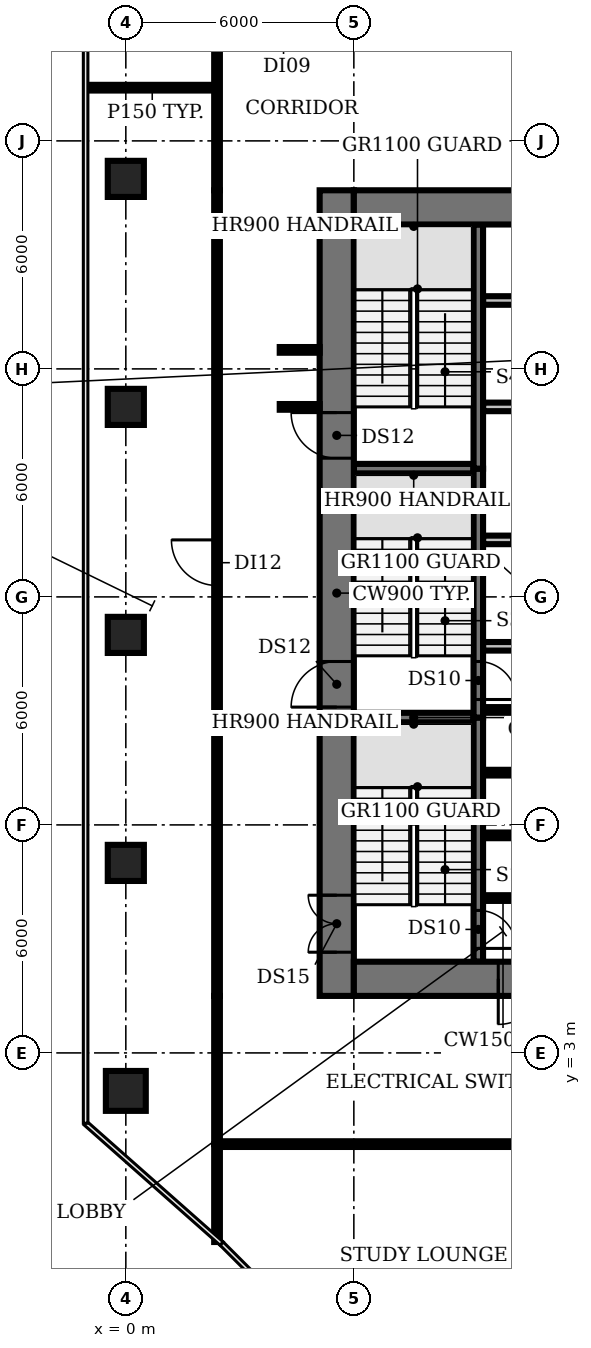
"""IFC4 building model, lengths in metres.
Left out: names, types, materials, properties, quantities, classifications, styles, units other than length and angle.
Written with IfcOpenShell. Run it as: python <this file> out.ifc"""

import sys

from ifc_helpers import new_model, si_unit, direction, frame, frame_2d, origin, origin_2d, place, context, subcontext, project, spatial, rectangle, circle, extrude, element, fill, save


model = new_model("IFC4")
c1 = context("Model", 3, precision=1e-05, world=origin(), true_north=direction((0.0, 1.0)))
c2 = subcontext(c1, "Body", "Model", "MODEL_VIEW")
j1 = project(units=[si_unit("LENGTHUNIT", "METRE"), si_unit("PLANEANGLEUNIT", "RADIAN")], contexts=[c1])
p1 = place(None, origin())
s1 = spatial("IfcSite", under=j1, at=p1, CompositionType="ELEMENT")
p2 = place(p1, origin())
s2 = spatial("IfcBuilding", under=s1, at=p2, CompositionType="ELEMENT")
p3 = place(p2, frame((0.0, 0.0, 66.8)))
s3 = spatial("IfcBuildingStorey", under=s2, at=p3, CompositionType="ELEMENT", Elevation=66.8)
p4 = place(p3, frame((0.0, 2.0, 0.0), z_axis=(0.0, 0.0, 1.0), x_axis=(1.0, 0.0, 0.0)))
e1 = element("IfcColumn", 1, at=p4, inside=s3, PredefinedType="COLUMN", context=c2, shape_type="SweptSolid", body=[
    extrude(circle(Radius=0.525, at=origin_2d()), origin(), (0.0, 0.0, 1.0), 3.85),
])
for number, where, z_axis, x_axis in (
    (2, (0.0, 8.0, 0.0), (0.0, 0.0, 1.0), (1.0, 0.0, 0.0)),
    (3, (0.0, 14.0, 0.0), (0.0, 0.0, 1.0), (1.0, 0.0, 0.0)),
    (4, (0.0, 20.0, 0.0), (0.0, 0.0, 1.0), (1.0, 0.0, 0.0)),
    (5, (0.0, 26.0, 0.0), (0.0, 0.0, 1.0), (1.0, 0.0, 0.0)),
):
    element("IfcColumn", number, at=place(p3, frame(where, z_axis=z_axis, x_axis=x_axis)), inside=s3, PredefinedType="COLUMN", context=c2, shape_type="SweptSolid", body=[
        extrude(rectangle(XDim=0.95, YDim=0.95, at=origin_2d()), origin(), (0.0, 0.0, 1.0), 3.85),
    ])
for number, where, z_axis, x_axis in (
    (6, (9.4, 7.075, 0.0), (0.0, 0.0, 1.0), (1.0, 0.0, 0.0)),
    (7, (9.4, 8.725, 0.0), (0.0, 0.0, 1.0), (1.0, 0.0, 0.0)),
    (8, (9.4, 10.375, 0.0), (0.0, 0.0, 1.0), (1.0, 0.0, 0.0)),
):
    element("IfcWall", number, at=place(p3, frame(where, z_axis=z_axis, x_axis=x_axis)), inside=s3, PredefinedType="SHEAR", context=c2, shape_type="SweptSolid", body=[
        extrude(rectangle(XDim=1.05, YDim=0.15, at=frame_2d((0.525, 0.0))), origin(), (0.0, 0.0, 1.0), 3.85),
    ])
p5 = place(p3, frame((6.0, 11.825, 0.0), z_axis=(0.0, 0.0, 1.0), x_axis=(1.0, 0.0, 0.0)))
e9 = element("IfcWall", 9, at=p5, inside=s3, PredefinedType="SHEAR", context=c2, shape_type="SweptSolid", body=[
    extrude(rectangle(XDim=3.15, YDim=0.25, at=frame_2d((1.575, 0.0))), origin(), (0.0, 0.0, 1.0), 3.85),
])
p6 = place(p3, frame((9.4, 12.025, 0.0), z_axis=(0.0, 0.0, 1.0), x_axis=(1.0, 0.0, 0.0)))
e10 = element("IfcWall", 10, at=p6, inside=s3, PredefinedType="SHEAR", context=c2, shape_type="SweptSolid", body=[
    extrude(rectangle(XDim=1.05, YDim=0.15, at=frame_2d((0.525, 0.0))), origin(), (0.0, 0.0, 1.0), 3.85),
])
p7 = place(p3, frame((9.4, 13.7, 0.0), z_axis=(0.0, 0.0, 1.0), x_axis=(1.0, 0.0, 0.0)))
e11 = element("IfcWall", 11, at=p7, inside=s3, PredefinedType="PARTITIONING", context=c2, shape_type="SweptSolid", body=[
    extrude(rectangle(XDim=4.0, YDim=0.225, at=frame_2d((2.0, 0.0))), origin(), (0.0, 0.0, 1.0), 3.85),
])
p8 = place(p3, frame((9.4, 16.5, 0.0), z_axis=(0.0, 0.0, 1.0), x_axis=(1.0, 0.0, 0.0)))
e12 = element("IfcWall", 12, at=p8, inside=s3, PredefinedType="PARTITIONING", context=c2, shape_type="SweptSolid", body=[
    extrude(rectangle(XDim=14.6, YDim=0.225, at=frame_2d((7.3, 0.0))), origin(), (0.0, 0.0, 1.0), 3.85),
])
p9 = place(p8, frame((0.75, 0.0, 0.0)))
e13 = element("IfcOpeningElement", 13, at=p9, cuts=e12, PredefinedType="OPENING", context=c2, shape_type="SweptSolid", body=[
    extrude(rectangle(XDim=1.1, YDim=2.1, at=frame_2d((0.55, 1.05))), frame((0.0, 0.123, 0.0), z_axis=(0.0, -1.0, 0.0), x_axis=(1.0, 0.0, 0.0)), (0.0, 0.0, 1.0), 0.245),
])
p10 = place(p8, frame((3.55, 0.0, 0.0)))
e14 = element("IfcOpeningElement", 14, at=p10, cuts=e12, PredefinedType="OPENING", context=c2, shape_type="SweptSolid", body=[
    extrude(rectangle(XDim=1.1, YDim=2.1, at=frame_2d((0.55, 1.05))), frame((0.0, 0.123, 0.0), z_axis=(0.0, -1.0, 0.0), x_axis=(1.0, 0.0, 0.0)), (0.0, 0.0, 1.0), 0.245),
])
p11 = place(p8, frame((6.35, 0.0, 0.0)))
e15 = element("IfcOpeningElement", 15, at=p11, cuts=e12, PredefinedType="OPENING", context=c2, shape_type="SweptSolid", body=[
    extrude(rectangle(XDim=1.1, YDim=2.1, at=frame_2d((0.55, 1.05))), frame((0.0, 0.123, 0.0), z_axis=(0.0, -1.0, 0.0), x_axis=(1.0, 0.0, 0.0)), (0.0, 0.0, 1.0), 0.245),
])
p12 = place(p8, frame((9.15, 0.0, 0.0)))
e16 = element("IfcOpeningElement", 16, at=p12, cuts=e12, PredefinedType="OPENING", context=c2, shape_type="SweptSolid", body=[
    extrude(rectangle(XDim=1.1, YDim=2.1, at=frame_2d((0.55, 1.05))), frame((0.0, 0.123, 0.0), z_axis=(0.0, -1.0, 0.0), x_axis=(1.0, 0.0, 0.0)), (0.0, 0.0, 1.0), 0.245),
])
p13 = place(p8, frame((11.308, 0.0, 0.0)))
e17 = element("IfcOpeningElement", 17, at=p13, cuts=e12, PredefinedType="OPENING", context=c2, shape_type="SweptSolid", body=[
    extrude(rectangle(XDim=0.9, YDim=2.1, at=frame_2d((0.45, 1.05))), frame((0.0, 0.123, 0.0), z_axis=(0.0, -1.0, 0.0), x_axis=(1.0, 0.0, 0.0)), (0.0, 0.0, 1.0), 0.245),
])
p14 = place(p8, frame((13.083, 0.0, 0.0)))
e18 = element("IfcOpeningElement", 18, at=p14, cuts=e12, PredefinedType="OPENING", context=c2, shape_type="SweptSolid", body=[
    extrude(rectangle(XDim=0.9, YDim=2.1, at=frame_2d((0.45, 1.05))), frame((0.0, 0.123, 0.0), z_axis=(0.0, -1.0, 0.0), x_axis=(1.0, 0.0, 0.0)), (0.0, 0.0, 1.0), 0.245),
])
p15 = place(p3, frame((6.0, 18.375, 0.0), z_axis=(0.0, 0.0, 1.0), x_axis=(1.0, 0.0, 0.0)))
e19 = element("IfcWall", 19, at=p15, inside=s3, PredefinedType="SHEAR", context=c2, shape_type="SweptSolid", body=[
    extrude(rectangle(XDim=3.15, YDim=0.25, at=frame_2d((1.575, 0.0))), origin(), (0.0, 0.0, 1.0), 3.85),
])
p16 = place(p3, frame((24.0, 20.0, 0.0), z_axis=(0.0, 0.0, 1.0), x_axis=(-1.0, 0.0, 0.0)))
e20 = element("IfcWall", 20, at=p16, inside=s3, PredefinedType="PARTITIONING", context=c2, shape_type="SweptSolid", body=[
    extrude(rectangle(XDim=14.6, YDim=0.225, at=frame_2d((7.3, 0.0))), origin(), (0.0, 0.0, 1.0), 3.85),
])
p17 = place(p16, frame((12.9, 0.0, 0.0)))
e21 = element("IfcOpeningElement", 21, at=p17, cuts=e20, PredefinedType="OPENING", context=c2, shape_type="SweptSolid", body=[
    extrude(rectangle(XDim=0.9, YDim=2.1, at=frame_2d((0.45, 1.05))), frame((0.0, 0.123, 0.0), z_axis=(0.0, -1.0, 0.0), x_axis=(1.0, 0.0, 0.0)), (0.0, 0.0, 1.0), 0.245),
])
p18 = place(p16, frame((9.475, 0.0, 0.0)))
e22 = element("IfcOpeningElement", 22, at=p18, cuts=e20, PredefinedType="OPENING", context=c2, shape_type="SweptSolid", body=[
    extrude(rectangle(XDim=1.0, YDim=2.1, at=frame_2d((0.5, 1.05))), frame((0.0, 0.123, 0.0), z_axis=(0.0, -1.0, 0.0), x_axis=(1.0, 0.0, 0.0)), (0.0, 0.0, 1.0), 0.245),
])
p19 = place(p16, frame((6.375, 0.0, 0.0)))
e23 = element("IfcOpeningElement", 23, at=p19, cuts=e20, PredefinedType="OPENING", context=c2, shape_type="SweptSolid", body=[
    extrude(rectangle(XDim=0.9, YDim=2.1, at=frame_2d((0.45, 1.05))), frame((0.0, 0.123, 0.0), z_axis=(0.0, -1.0, 0.0), x_axis=(1.0, 0.0, 0.0)), (0.0, 0.0, 1.0), 0.245),
])
p20 = place(p16, frame((4.175, 0.0, 0.0)))
e24 = element("IfcOpeningElement", 24, at=p20, cuts=e20, PredefinedType="OPENING", context=c2, shape_type="SweptSolid", body=[
    extrude(rectangle(XDim=0.9, YDim=2.1, at=frame_2d((0.45, 1.05))), frame((0.0, 0.123, 0.0), z_axis=(0.0, -1.0, 0.0), x_axis=(1.0, 0.0, 0.0)), (0.0, 0.0, 1.0), 0.245),
])
p21 = place(p16, frame((2.308, 0.0, 0.0)))
e25 = element("IfcOpeningElement", 25, at=p21, cuts=e20, PredefinedType="OPENING", context=c2, shape_type="SweptSolid", body=[
    extrude(rectangle(XDim=0.9, YDim=2.1, at=frame_2d((0.45, 1.05))), frame((0.0, 0.123, 0.0), z_axis=(0.0, -1.0, 0.0), x_axis=(1.0, 0.0, 0.0)), (0.0, 0.0, 1.0), 0.245),
])
p22 = place(p16, frame((0.532, 0.0, 0.0)))
e26 = element("IfcOpeningElement", 26, at=p22, cuts=e20, PredefinedType="OPENING", context=c2, shape_type="SweptSolid", body=[
    extrude(rectangle(XDim=0.9, YDim=2.1, at=frame_2d((0.45, 1.05))), frame((0.0, 0.123, 0.0), z_axis=(0.0, -1.0, 0.0), x_axis=(1.0, 0.0, 0.0)), (0.0, 0.0, 1.0), 0.245),
])
p23 = place(p3, frame((9.4, 22.8, 0.0), z_axis=(0.0, 0.0, 1.0), x_axis=(1.0, 0.0, 0.0)))
e27 = element("IfcWall", 27, at=p23, inside=s3, PredefinedType="PARTITIONING", context=c2, shape_type="SweptSolid", body=[
    extrude(rectangle(XDim=14.6, YDim=0.225, at=frame_2d((7.3, 0.0))), origin(), (0.0, 0.0, 1.0), 3.85),
])
p24 = place(p3, frame((9.275, 11.825, 0.0), z_axis=(0.0, 0.0, 1.0), x_axis=(0.0, -1.0, 0.0)))
e28 = element("IfcWall", 28, at=p24, inside=s3, PredefinedType="SHEAR", context=c2, shape_type="SweptSolid", body=[
    extrude(rectangle(XDim=6.425, YDim=0.25, at=frame_2d((3.212, 0.0))), origin(), (0.0, 0.0, 1.0), 3.85),
])
p25 = place(p24, frame((5.075, 0.0, 0.0)))
e29 = element("IfcOpeningElement", 29, at=p25, cuts=e28, PredefinedType="OPENING", context=c2, shape_type="SweptSolid", body=[
    extrude(rectangle(XDim=1.0, YDim=2.1, at=frame_2d((0.5, 1.05))), frame((0.0, 0.135, 0.0), z_axis=(0.0, -1.0, 0.0), x_axis=(1.0, 0.0, 0.0)), (0.0, 0.0, 1.0), 0.27),
])
p26 = place(p3, frame((9.275, 18.375, 0.0), z_axis=(0.0, 0.0, 1.0), x_axis=(0.0, -1.0, 0.0)))
e30 = element("IfcWall", 30, at=p26, inside=s3, PredefinedType="SHEAR", context=c2, shape_type="SweptSolid", body=[
    extrude(rectangle(XDim=6.55, YDim=0.25, at=frame_2d((3.275, 0.0))), origin(), (0.0, 0.0, 1.0), 3.85),
])
p27 = place(p26, frame((5.075, 0.0, 0.0)))
e31 = element("IfcOpeningElement", 31, at=p27, cuts=e30, PredefinedType="OPENING", context=c2, shape_type="SweptSolid", body=[
    extrude(rectangle(XDim=1.0, YDim=2.1, at=frame_2d((0.5, 1.05))), frame((0.0, 0.135, 0.0), z_axis=(0.0, -1.0, 0.0), x_axis=(1.0, 0.0, 0.0)), (0.0, 0.0, 1.0), 0.27),
])
p28 = place(p3, frame((9.275, 18.375, 0.0), z_axis=(0.0, 0.0, 1.0), x_axis=(0.0, 1.0, 0.0)))
e32 = element("IfcWall", 32, at=p28, inside=s3, PredefinedType="SHEAR", context=c2, shape_type="SweptSolid", body=[
    extrude(rectangle(XDim=6.425, YDim=0.25, at=frame_2d((3.212, 0.0))), origin(), (0.0, 0.0, 1.0), 3.85),
])
p29 = place(p3, frame((5.55, 4.5, 0.0), z_axis=(0.0, 0.0, 1.0), x_axis=(0.0, 1.0, 0.0)))
e33 = element("IfcWall", 33, at=p29, inside=s3, PredefinedType="SHEAR", context=c2, shape_type="SweptSolid", body=[
    extrude(rectangle(XDim=21.2, YDim=0.9, at=frame_2d((10.6, 0.0))), origin(), (0.0, 0.0, 1.0), 3.85),
])
p30 = place(p29, frame((1.15, 0.0, 0.0)))
e34 = element("IfcOpeningElement", 34, at=p30, cuts=e33, PredefinedType="OPENING", context=c2, shape_type="SweptSolid", body=[
    extrude(rectangle(XDim=1.5, YDim=2.1, at=frame_2d((0.75, 1.05))), frame((0.0, 0.46, 0.0), z_axis=(0.0, -1.0, 0.0), x_axis=(1.0, 0.0, 0.0)), (0.0, 0.0, 1.0), 0.92),
])
p31 = place(p29, frame((7.6, 0.0, 0.0)))
e35 = element("IfcOpeningElement", 35, at=p31, cuts=e33, PredefinedType="OPENING", context=c2, shape_type="SweptSolid", body=[
    extrude(rectangle(XDim=1.2, YDim=2.1, at=frame_2d((0.6, 1.05))), frame((0.0, 0.46, 0.0), z_axis=(0.0, -1.0, 0.0), x_axis=(1.0, 0.0, 0.0)), (0.0, 0.0, 1.0), 0.92),
])
p32 = place(p29, frame((14.15, 0.0, 0.0)))
e36 = element("IfcOpeningElement", 36, at=p32, cuts=e33, PredefinedType="OPENING", context=c2, shape_type="SweptSolid", body=[
    extrude(rectangle(XDim=1.2, YDim=2.1, at=frame_2d((0.6, 1.05))), frame((0.0, 0.46, 0.0), z_axis=(0.0, -1.0, 0.0), x_axis=(1.0, 0.0, 0.0)), (0.0, 0.0, 1.0), 0.92),
])
p33 = place(p3, frame((24.0, 4.95, 0.0), z_axis=(0.0, 0.0, 1.0), x_axis=(-1.0, 0.0, 0.0)))
e37 = element("IfcWall", 37, at=p33, inside=s3, PredefinedType="SHEAR", context=c2, shape_type="SweptSolid", body=[
    extrude(rectangle(XDim=18.0, YDim=0.9, at=frame_2d((9.0, 0.0))), origin(), (0.0, 0.0, 1.0), 3.85),
])
p34 = place(p33, frame((13.0, 0.0, 0.0)))
e38 = element("IfcOpeningElement", 38, at=p34, cuts=e37, PredefinedType="OPENING", context=c2, shape_type="SweptSolid", body=[
    extrude(rectangle(XDim=1.2, YDim=2.1, at=frame_2d((0.6, 1.05))), frame((0.0, 0.46, 0.0), z_axis=(0.0, -1.0, 0.0), x_axis=(1.0, 0.0, 0.0)), (0.0, 0.0, 1.0), 0.92),
])
p35 = place(p33, frame((4.9, 0.0, 0.0)))
e39 = element("IfcOpeningElement", 39, at=p35, cuts=e37, PredefinedType="OPENING", context=c2, shape_type="SweptSolid", body=[
    extrude(rectangle(XDim=1.0, YDim=2.1, at=frame_2d((0.5, 1.05))), frame((0.0, 0.46, 0.0), z_axis=(0.0, -1.0, 0.0), x_axis=(1.0, 0.0, 0.0)), (0.0, 0.0, 1.0), 0.92),
])
p36 = place(p3, frame((6.0, 25.25, 0.0), z_axis=(0.0, 0.0, 1.0), x_axis=(1.0, 0.0, 0.0)))
e40 = element("IfcWall", 40, at=p36, inside=s3, PredefinedType="SHEAR", context=c2, shape_type="SweptSolid", body=[
    extrude(rectangle(XDim=18.0, YDim=0.9, at=frame_2d((9.0, 0.0))), origin(), (0.0, 0.0, 1.0), 3.85),
])
p37 = place(p3, frame((-1.01, 28.4, 0.0), z_axis=(0.0, 0.0, 1.0), x_axis=(1.0, 0.0, 0.0)))
e41 = element("IfcWall", 41, at=p37, inside=s3, PredefinedType="PARTITIONING", context=c2, shape_type="SweptSolid", body=[
    extrude(rectangle(XDim=3.41, YDim=0.15, at=frame_2d((1.705, 0.0))), origin(), (0.0, 0.0, 1.0), 2.83),
])
p38 = place(p3, frame((2.4, -1.976, 0.0), z_axis=(0.0, 0.0, 1.0), x_axis=(0.0, 1.0, 0.0)))
e42 = element("IfcWall", 42, at=p38, inside=s3, PredefinedType="PARTITIONING", context=c2, shape_type="SweptSolid", body=[
    extrude(rectangle(XDim=2.576, YDim=0.15, at=frame_2d((1.288, 0.0))), origin(), (0.0, 0.0, 1.0), 2.83),
])
p39 = place(p3, frame((2.4, 0.6, 0.0), z_axis=(0.0, 0.0, 1.0), x_axis=(0.0, 1.0, 0.0)))
e43 = element("IfcWall", 43, at=p39, inside=s3, PredefinedType="PARTITIONING", context=c2, shape_type="SweptSolid", body=[
    extrude(rectangle(XDim=3.9, YDim=0.15, at=frame_2d((1.95, 0.0))), origin(), (0.0, 0.0, 1.0), 2.83),
])
p40 = place(p3, frame((2.4, 4.5, 0.0), z_axis=(0.0, 0.0, 1.0), x_axis=(0.0, 1.0, 0.0)))
e44 = element("IfcWall", 44, at=p40, inside=s3, PredefinedType="PARTITIONING", context=c2, shape_type="SweptSolid", body=[
    extrude(rectangle(XDim=21.2, YDim=0.15, at=frame_2d((10.6, 0.0))), origin(), (0.0, 0.0, 1.0), 2.83),
])
p41 = place(p40, frame((10.8, 0.0, 0.0)))
e45 = element("IfcOpeningElement", 45, at=p41, cuts=e44, PredefinedType="OPENING", context=c2, shape_type="SweptSolid", body=[
    extrude(rectangle(XDim=1.2, YDim=2.1, at=frame_2d((0.6, 1.05))), frame((0.0, 0.085, 0.0), z_axis=(0.0, -1.0, 0.0), x_axis=(1.0, 0.0, 0.0)), (0.0, 0.0, 1.0), 0.17),
])
p42 = place(p3, frame((2.4, 25.7, 0.0), z_axis=(0.0, 0.0, 1.0), x_axis=(0.0, 1.0, 0.0)))
e46 = element("IfcWall", 46, at=p42, inside=s3, PredefinedType="PARTITIONING", context=c2, shape_type="SweptSolid", body=[
    extrude(rectangle(XDim=3.9, YDim=0.15, at=frame_2d((1.95, 0.0))), origin(), (0.0, 0.0, 1.0), 2.83),
])
for number, where, z_axis, x_axis in (
    (47, (4.05, 20.0, 0.0), (0.0, 0.0, 1.0), (1.0, 0.0, 0.0)),
    (48, (4.05, 21.5, 0.0), (0.0, 0.0, 1.0), (1.0, 0.0, 0.0)),
):
    element("IfcWall", number, at=place(p3, frame(where, z_axis=z_axis, x_axis=x_axis)), inside=s3, PredefinedType="PARTITIONING", context=c2, shape_type="SweptSolid", body=[
        extrude(rectangle(XDim=1.05, YDim=0.15, at=frame_2d((0.525, 0.0))), origin(), (0.0, 0.0, 1.0), 2.83),
    ])
p43 = place(p3, frame((27.6, 0.6, 0.0), z_axis=(0.0, 0.0, 1.0), x_axis=(-1.0, 0.0, 0.0)))
e49 = element("IfcWall", 49, at=p43, inside=s3, PredefinedType="PARTITIONING", context=c2, shape_type="SweptSolid", body=[
    extrude(rectangle(XDim=25.2, YDim=0.15, at=frame_2d((12.6, 0.0))), origin(), (0.0, 0.0, 1.0), 2.83),
])
p44 = place(p43, frame((12.1, 0.0, 0.0)))
e50 = element("IfcOpeningElement", 50, at=p44, cuts=e49, PredefinedType="OPENING", context=c2, shape_type="SweptSolid", body=[
    extrude(rectangle(XDim=1.2, YDim=2.1, at=frame_2d((0.6, 1.05))), frame((0.0, 0.085, 0.0), z_axis=(0.0, -1.0, 0.0), x_axis=(1.0, 0.0, 0.0)), (0.0, 0.0, 1.0), 0.17),
])
p45 = place(p25, origin())
e51 = element("IfcDoor", 51, at=p45, inside=s3, OperationType="SINGLE_SWING_RIGHT", PredefinedType="DOOR", context=c2, shape_type="SweptSolid", body=[
    extrude(rectangle(XDim=1.0, YDim=2.1, at=frame_2d((0.5, 1.05))), frame((0.0, 0.025, 0.0), z_axis=(0.0, -1.0, 0.0), x_axis=(1.0, 0.0, 0.0)), (0.0, 0.0, 1.0), 0.05),
])
fill(e29, e51)
p46 = place(p27, origin())
e52 = element("IfcDoor", 52, at=p46, inside=s3, OperationType="SINGLE_SWING_RIGHT", PredefinedType="DOOR", context=c2, shape_type="SweptSolid", body=[
    extrude(rectangle(XDim=1.0, YDim=2.1, at=frame_2d((0.5, 1.05))), frame((0.0, 0.025, 0.0), z_axis=(0.0, -1.0, 0.0), x_axis=(1.0, 0.0, 0.0)), (0.0, 0.0, 1.0), 0.05),
])
fill(e31, e52)
p47 = place(p30, origin())
e53 = element("IfcDoor", 53, at=p47, inside=s3, OperationType="DOUBLE_DOOR_SINGLE_SWING", PredefinedType="DOOR", context=c2, shape_type="SweptSolid", body=[
    extrude(rectangle(XDim=1.5, YDim=2.1, at=frame_2d((0.75, 1.05))), frame((0.0, 0.025, 0.0), z_axis=(0.0, -1.0, 0.0), x_axis=(1.0, 0.0, 0.0)), (0.0, 0.0, 1.0), 0.05),
])
fill(e34, e53)
p48 = place(p31, origin())
e54 = element("IfcDoor", 54, at=p48, inside=s3, OperationType="SINGLE_SWING_LEFT", PredefinedType="DOOR", context=c2, shape_type="SweptSolid", body=[
    extrude(rectangle(XDim=1.2, YDim=2.1, at=frame_2d((0.6, 1.05))), frame((0.0, 0.025, 0.0), z_axis=(0.0, -1.0, 0.0), x_axis=(1.0, 0.0, 0.0)), (0.0, 0.0, 1.0), 0.05),
])
fill(e35, e54)
p49 = place(p32, origin())
e55 = element("IfcDoor", 55, at=p49, inside=s3, OperationType="SINGLE_SWING_RIGHT", PredefinedType="DOOR", context=c2, shape_type="SweptSolid", body=[
    extrude(rectangle(XDim=1.2, YDim=2.1, at=frame_2d((0.6, 1.05))), frame((0.0, 0.025, 0.0), z_axis=(0.0, -1.0, 0.0), x_axis=(1.0, 0.0, 0.0)), (0.0, 0.0, 1.0), 0.05),
])
fill(e36, e55)
p50 = place(p34, origin())
e56 = element("IfcDoor", 56, at=p50, inside=s3, OperationType="SINGLE_SWING_RIGHT", PredefinedType="DOOR", context=c2, shape_type="SweptSolid", body=[
    extrude(rectangle(XDim=1.2, YDim=2.1, at=frame_2d((0.6, 1.05))), frame((0.0, 0.025, 0.0), z_axis=(0.0, -1.0, 0.0), x_axis=(1.0, 0.0, 0.0)), (0.0, 0.0, 1.0), 0.05),
])
fill(e38, e56)
p51 = place(p41, origin())
e57 = element("IfcDoor", 57, at=p51, inside=s3, OperationType="SINGLE_SWING_RIGHT", PredefinedType="DOOR", context=c2, shape_type="SweptSolid", body=[
    extrude(rectangle(XDim=1.2, YDim=2.1, at=frame_2d((0.6, 1.05))), frame((0.0, 0.025, 0.0), z_axis=(0.0, -1.0, 0.0), x_axis=(1.0, 0.0, 0.0)), (0.0, 0.0, 1.0), 0.05),
])
fill(e45, e57)
save(model, sys.argv[1])
